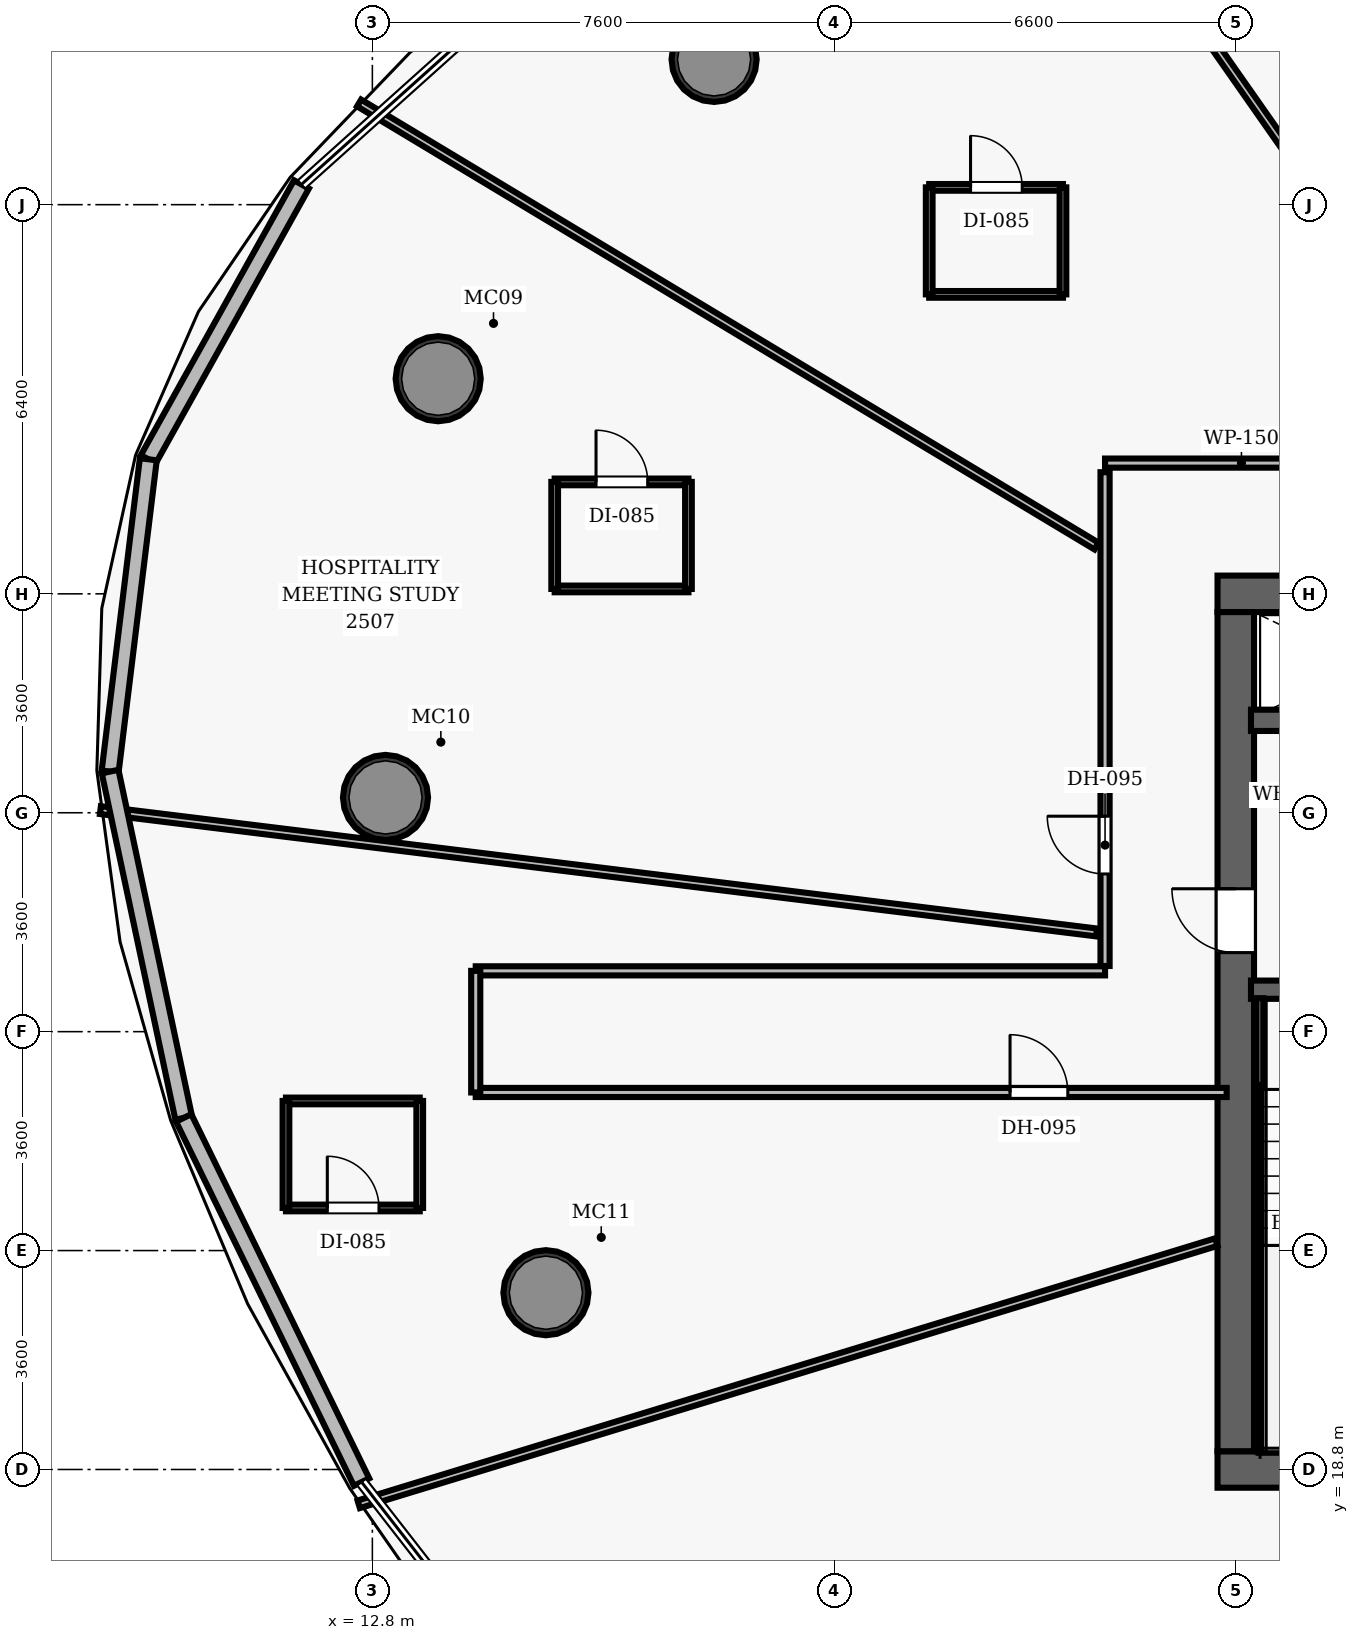
"""IFC4 building model, lengths in metres.
Left out: names, types, materials, properties, quantities, classifications, styles, units other than length and angle.
Written with IfcOpenShell. Run it as: python <this file> out.ifc"""

import sys

from ifc_helpers import new_model, si_unit, direction, frame, frame_2d, origin, origin_2d, place, context, subcontext, project, spatial, rectangle, hollow_circle, extrude, element, fill, save


model = new_model("IFC4")
c1 = context("Model", 3, precision=1e-05, world=origin(), true_north=direction((0.0, 1.0)))
c2 = subcontext(c1, "Body", "Model", "MODEL_VIEW")
j1 = project(units=[si_unit("LENGTHUNIT", "METRE"), si_unit("PLANEANGLEUNIT", "RADIAN")], contexts=[c1])
p1 = place(None, origin())
s1 = spatial("IfcSite", under=j1, at=p1, CompositionType="ELEMENT")
p2 = place(p1, origin())
s2 = spatial("IfcBuilding", under=s1, at=p2, CompositionType="ELEMENT")
p3 = place(p2, frame((0.0, 0.0, 106.3)))
s3 = spatial("IfcBuildingStorey", under=s2, at=p3, CompositionType="ELEMENT", Elevation=106.3)
p4 = place(p3, frame((26.7, 18.8, 0.0), z_axis=(0.0, 0.0, 1.0), x_axis=(1.0, 0.0, 0.0)))
e1 = element("IfcWall", 1, at=p4, inside=s3, PredefinedType="SHEAR", context=c2, shape_type="SweptSolid", body=[
    extrude(rectangle(XDim=22.6, YDim=0.6, at=frame_2d((11.3, 0.0))), origin(), (0.0, 0.0, 1.0), 3.5),
])
p5 = place(p4, frame((14.52, 0.0, 0.0)))
e2 = element("IfcOpeningElement", 2, at=p5, cuts=e1, PredefinedType="OPENING", context=c2, shape_type="SweptSolid", body=[
    extrude(rectangle(XDim=1.05, YDim=2.15, at=frame_2d((0.525, 1.075))), frame((0.0, 0.31, 0.0), z_axis=(0.0, -1.0, 0.0), x_axis=(1.0, 0.0, 0.0)), (0.0, 0.0, 1.0), 0.62),
])
p6 = place(p3, frame((26.7, 33.2, 0.0), z_axis=(0.0, 0.0, 1.0), x_axis=(1.0, 0.0, 0.0)))
e3 = element("IfcWall", 3, at=p6, inside=s3, PredefinedType="SHEAR", context=c2, shape_type="SweptSolid", body=[
    extrude(rectangle(XDim=22.6, YDim=0.6, at=frame_2d((11.3, 0.0))), origin(), (0.0, 0.0, 1.0), 3.5),
])
p7 = place(p6, frame((4.62, 0.0, 0.0)))
e4 = element("IfcOpeningElement", 4, at=p7, cuts=e3, PredefinedType="OPENING", context=c2, shape_type="SweptSolid", body=[
    extrude(rectangle(XDim=1.05, YDim=2.15, at=frame_2d((0.525, 1.075))), frame((0.0, 0.31, 0.0), z_axis=(0.0, -1.0, 0.0), x_axis=(1.0, 0.0, 0.0)), (0.0, 0.0, 1.0), 0.62),
])
p8 = place(p6, frame((14.52, 0.0, 0.0)))
e5 = element("IfcOpeningElement", 5, at=p8, cuts=e3, PredefinedType="OPENING", context=c2, shape_type="SweptSolid", body=[
    extrude(rectangle(XDim=1.05, YDim=2.15, at=frame_2d((0.525, 1.075))), frame((0.0, 0.31, 0.0), z_axis=(0.0, -1.0, 0.0), x_axis=(1.0, 0.0, 0.0)), (0.0, 0.0, 1.0), 0.62),
])
p9 = place(p3, frame((27.0, 19.1, 0.0), z_axis=(0.0, 0.0, 1.0), x_axis=(0.0, 1.0, 0.0)))
e6 = element("IfcWall", 6, at=p9, inside=s3, PredefinedType="SHEAR", context=c2, shape_type="SweptSolid", body=[
    extrude(rectangle(XDim=13.8, YDim=0.6, at=frame_2d((6.9, 0.0))), origin(), (0.0, 0.0, 1.0), 3.5),
])
p10 = place(p9, frame((8.2, 0.0, 0.0)))
e7 = element("IfcOpeningElement", 7, at=p10, cuts=e6, PredefinedType="OPENING", context=c2, shape_type="SweptSolid", body=[
    extrude(rectangle(XDim=1.05, YDim=2.15, at=frame_2d((0.525, 1.075))), frame((0.0, 0.31, 0.0), z_axis=(0.0, -1.0, 0.0), x_axis=(1.0, 0.0, 0.0)), (0.0, 0.0, 1.0), 0.62),
])
for number, where, z_axis, x_axis in (
    (8, (18.42, 41.989, 0.0), (0.0, 0.0, 1.0), (1.0, 0.0, 0.0)),
    (9, (13.882, 36.738, 0.0), (0.0, 0.0, 1.0), (1.0, 0.0, 0.0)),
    (10, (13.016, 29.852, 0.0), (0.0, 0.0, 1.0), (1.0, 0.0, 0.0)),
    (11, (15.654, 21.707, 0.0), (0.0, 0.0, 1.0), (1.0, 0.0, 0.0)),
):
    element("IfcColumn", number, at=place(p3, frame(where, z_axis=z_axis, x_axis=x_axis)), inside=s3, PredefinedType="COLUMN", context=c2, shape_type="SweptSolid", body=[
        extrude(hollow_circle(Radius=0.7, WallThickness=0.055, at=origin_2d()), origin(), (0.0, 0.0, 1.0), 3.5),
    ])
p11 = place(p3, frame((27.25, 26.69, 0.0), z_axis=(0.0, 0.0, 1.0), x_axis=(1.0, 0.0, 0.0)))
e12 = element("IfcWall", 12, at=p11, inside=s3, PredefinedType="SHEAR", context=c2, shape_type="SweptSolid", body=[
    extrude(rectangle(XDim=3.67, YDim=0.3, at=frame_2d((1.835, 0.0))), origin(), (0.0, 0.0, 1.0), 3.5),
])
p12 = place(p11, frame((1.05, 0.0, 0.0)))
e13 = element("IfcOpeningElement", 13, at=p12, cuts=e12, PredefinedType="OPENING", context=c2, shape_type="SweptSolid", body=[
    extrude(rectangle(XDim=1.1, YDim=2.15, at=frame_2d((0.55, 1.075))), frame((0.0, 0.16, 0.0), z_axis=(0.0, -1.0, 0.0), x_axis=(1.0, 0.0, 0.0)), (0.0, 0.0, 1.0), 0.32),
])
p13 = place(p3, frame((27.395, 19.1, 0.0), z_axis=(0.0, 0.0, 1.0), x_axis=(0.0, 1.0, 0.0)))
e14 = element("IfcWall", 14, at=p13, inside=s3, PredefinedType="SHEAR", context=c2, shape_type="SweptSolid", body=[
    extrude(rectangle(XDim=7.45, YDim=0.12, at=frame_2d((3.725, 0.0))), origin(), (0.0, 0.0, 1.0), 3.5),
])
p14 = place(p3, frame((27.395, 19.16, 0.0), z_axis=(0.0, 0.0, 1.0), x_axis=(1.0, 0.0, 0.0)))
e15 = element("IfcWall", 15, at=p14, inside=s3, PredefinedType="SHEAR", context=c2, shape_type="SweptSolid", body=[
    extrude(rectangle(XDim=3.095, YDim=0.12, at=frame_2d((1.547, 0.0))), origin(), (0.0, 0.0, 1.0), 3.5),
])
p15 = place(p3, frame((27.25, 31.12, 0.0), z_axis=(0.0, 0.0, 1.0), x_axis=(1.0, 0.0, 0.0)))
e16 = element("IfcWall", 16, at=p15, inside=s3, PredefinedType="SHEAR", context=c2, shape_type="SweptSolid", body=[
    extrude(rectangle(XDim=3.67, YDim=0.35, at=frame_2d((1.835, 0.0))), origin(), (0.0, 0.0, 1.0), 2.675),
])
p16 = place(p15, frame((1.25, 0.0, 0.0)))
e17 = element("IfcOpeningElement", 17, at=p16, cuts=e16, PredefinedType="OPENING", context=c2, shape_type="SweptSolid", body=[
    extrude(rectangle(XDim=1.1, YDim=2.15, at=frame_2d((0.55, 1.075))), frame((0.0, 0.185, 0.0), z_axis=(0.0, -1.0, 0.0), x_axis=(1.0, 0.0, 0.0)), (0.0, 0.0, 1.0), 0.37),
])
p17 = place(p3, frame((24.85, 35.35, 0.0), z_axis=(0.0, 0.0, 1.0), x_axis=(1.0, 0.0, 0.0)))
e18 = element("IfcWall", 18, at=p17, inside=s3, PredefinedType="PARTITIONING", context=c2, shape_type="SweptSolid", body=[
    extrude(rectangle(XDim=26.0, YDim=0.15, at=frame_2d((13.0, 0.0))), origin(), (0.0, 0.0, 1.0), 2.675),
])
p18 = place(p17, frame((21.017, 0.0, 0.0)))
e19 = element("IfcOpeningElement", 19, at=p18, cuts=e18, PredefinedType="OPENING", context=c2, shape_type="SweptSolid", body=[
    extrude(rectangle(XDim=0.95, YDim=2.15, at=frame_2d((0.475, 1.075))), frame((0.0, 0.085, 0.0), z_axis=(0.0, -1.0, 0.0), x_axis=(1.0, 0.0, 0.0)), (0.0, 0.0, 1.0), 0.17),
])
p19 = place(p17, frame((15.954, 0.0, 0.0)))
e20 = element("IfcOpeningElement", 20, at=p19, cuts=e18, PredefinedType="OPENING", context=c2, shape_type="SweptSolid", body=[
    extrude(rectangle(XDim=0.95, YDim=2.15, at=frame_2d((0.475, 1.075))), frame((0.0, 0.085, 0.0), z_axis=(0.0, -1.0, 0.0), x_axis=(1.0, 0.0, 0.0)), (0.0, 0.0, 1.0), 0.17),
])
p20 = place(p17, frame((12.155, 0.0, 0.0)))
e21 = element("IfcOpeningElement", 21, at=p20, cuts=e18, PredefinedType="OPENING", context=c2, shape_type="SweptSolid", body=[
    extrude(rectangle(XDim=0.95, YDim=2.15, at=frame_2d((0.475, 1.075))), frame((0.0, 0.085, 0.0), z_axis=(0.0, -1.0, 0.0), x_axis=(1.0, 0.0, 0.0)), (0.0, 0.0, 1.0), 0.17),
])
p21 = place(p17, frame((7.086, 0.0, 0.0)))
e22 = element("IfcOpeningElement", 22, at=p21, cuts=e18, PredefinedType="OPENING", context=c2, shape_type="SweptSolid", body=[
    extrude(rectangle(XDim=0.95, YDim=2.15, at=frame_2d((0.475, 1.075))), frame((0.0, 0.085, 0.0), z_axis=(0.0, -1.0, 0.0), x_axis=(1.0, 0.0, 0.0)), (0.0, 0.0, 1.0), 0.17),
])
p22 = place(p17, frame((4.637, 0.0, 0.0)))
e23 = element("IfcOpeningElement", 23, at=p22, cuts=e18, PredefinedType="OPENING", context=c2, shape_type="SweptSolid", body=[
    extrude(rectangle(XDim=0.95, YDim=2.15, at=frame_2d((0.475, 1.075))), frame((0.0, 0.085, 0.0), z_axis=(0.0, -1.0, 0.0), x_axis=(1.0, 0.0, 0.0)), (0.0, 0.0, 1.0), 0.17),
])
p23 = place(p3, frame((24.85, 27.08, 0.0), z_axis=(0.0, 0.0, 1.0), x_axis=(0.0, 1.0, 0.0)))
e24 = element("IfcWall", 24, at=p23, inside=s3, PredefinedType="PARTITIONING", context=c2, shape_type="SweptSolid", body=[
    extrude(rectangle(XDim=8.12, YDim=0.15, at=frame_2d((4.06, 0.0))), origin(), (0.0, 0.0, 1.0), 2.675),
])
p24 = place(p23, frame((1.513, 0.0, 0.0)))
e25 = element("IfcOpeningElement", 25, at=p24, cuts=e24, PredefinedType="OPENING", context=c2, shape_type="SweptSolid", body=[
    extrude(rectangle(XDim=0.95, YDim=2.15, at=frame_2d((0.475, 1.075))), frame((0.0, 0.085, 0.0), z_axis=(0.0, -1.0, 0.0), x_axis=(1.0, 0.0, 0.0)), (0.0, 0.0, 1.0), 0.17),
])
p25 = place(p3, frame((14.5, 27.0, 0.0), z_axis=(0.0, 0.0, 1.0), x_axis=(1.0, 0.0, 0.0)))
e26 = element("IfcWall", 26, at=p25, inside=s3, PredefinedType="PARTITIONING", context=c2, shape_type="SweptSolid", body=[
    extrude(rectangle(XDim=10.35, YDim=0.15, at=frame_2d((5.175, 0.0))), origin(), (0.0, 0.0, 1.0), 2.675),
])
p26 = place(p3, frame((14.5, 25.0, 0.0), z_axis=(0.0, 0.0, 1.0), x_axis=(1.0, 0.0, 0.0)))
e27 = element("IfcWall", 27, at=p26, inside=s3, PredefinedType="PARTITIONING", context=c2, shape_type="SweptSolid", body=[
    extrude(rectangle(XDim=12.35, YDim=0.15, at=frame_2d((6.175, 0.0))), origin(), (0.0, 0.0, 1.0), 2.675),
])
p27 = place(p26, frame((8.788, 0.0, 0.0)))
e28 = element("IfcOpeningElement", 28, at=p27, cuts=e27, PredefinedType="OPENING", context=c2, shape_type="SweptSolid", body=[
    extrude(rectangle(XDim=0.95, YDim=2.15, at=frame_2d((0.475, 1.075))), frame((0.0, 0.085, 0.0), z_axis=(0.0, -1.0, 0.0), x_axis=(1.0, 0.0, 0.0)), (0.0, 0.0, 1.0), 0.17),
])
p28 = place(p3, frame((14.5, 25.0, 0.0), z_axis=(0.0, 0.0, 1.0), x_axis=(0.0, 1.0, 0.0)))
e29 = element("IfcWall", 29, at=p28, inside=s3, PredefinedType="PARTITIONING", context=c2, shape_type="SweptSolid", body=[
    extrude(rectangle(XDim=2.0, YDim=0.15, at=frame_2d((1.0, 0.0))), origin(), (0.0, 0.0, 1.0), 2.675),
])
p29 = place(p3, frame((31.355, 35.49, 0.0), z_axis=(0.0, 0.0, 1.0), x_axis=(-0.573570204907, 0.819156407557, 0.0)))
e30 = element("IfcWall", 30, at=p29, inside=s3, PredefinedType="PARTITIONING", context=c2, shape_type="SweptSolid", body=[
    extrude(rectangle(XDim=14.735, YDim=0.13, at=frame_2d((7.367, 0.0))), origin(), (0.0, 0.0, 1.0), 2.675),
])
p30 = place(p3, frame((24.71, 33.985, 0.0), z_axis=(0.0, 0.0, 1.0), x_axis=(-0.85716694246, 0.515038671125, 0.0)))
e31 = element("IfcWall", 31, at=p30, inside=s3, PredefinedType="PARTITIONING", context=c2, shape_type="SweptSolid", body=[
    extrude(rectangle(XDim=14.149, YDim=0.13, at=frame_2d((7.075, 0.0))), origin(), (0.0, 0.0, 1.0), 2.675),
])
p31 = place(p3, frame((24.71, 27.632, 0.0), z_axis=(0.0, 0.0, 1.0), x_axis=(-0.992546751309, 0.121864459407, 0.0)))
e32 = element("IfcWall", 32, at=p31, inside=s3, PredefinedType="PARTITIONING", context=c2, shape_type="SweptSolid", body=[
    extrude(rectangle(XDim=16.506, YDim=0.13, at=frame_2d((8.253, 0.0))), origin(), (0.0, 0.0, 1.0), 2.675),
])
p32 = place(p3, frame((26.68, 22.539, 0.0), z_axis=(0.0, 0.0, 1.0), x_axis=(-0.956307870359, -0.292361517799, 0.0)))
e33 = element("IfcWall", 33, at=p32, inside=s3, PredefinedType="PARTITIONING", context=c2, shape_type="SweptSolid", body=[
    extrude(rectangle(XDim=14.749, YDim=0.13, at=frame_2d((7.375, 0.0))), origin(), (0.0, 0.0, 1.0), 2.675),
])
p33 = place(p3, frame((29.349, 18.48, 0.0), z_axis=(0.0, 0.0, 1.0), x_axis=(-0.754706894701, -0.656062118317, 0.0)))
e34 = element("IfcWall", 34, at=p33, inside=s3, PredefinedType="PARTITIONING", context=c2, shape_type="SweptSolid", body=[
    extrude(rectangle(XDim=12.805, YDim=0.13, at=frame_2d((6.403, 0.0))), origin(), (0.0, 0.0, 1.0), 2.675),
])
p34 = place(p3, frame((21.958, 38.125, 0.0), z_axis=(0.0, 0.0, 1.0), x_axis=(1.0, 0.0, 0.0)))
e35 = element("IfcWall", 35, at=p34, inside=s3, PredefinedType="PARTITIONING", context=c2, shape_type="SweptSolid", body=[
    extrude(rectangle(XDim=2.2, YDim=0.11, at=frame_2d((1.1, 0.0))), origin(), (0.0, 0.0, 1.0), 2.675),
])
p35 = place(p3, frame((21.958, 39.885, 0.0), z_axis=(0.0, 0.0, 1.0), x_axis=(1.0, 0.0, 0.0)))
e36 = element("IfcWall", 36, at=p35, inside=s3, PredefinedType="PARTITIONING", context=c2, shape_type="SweptSolid", body=[
    extrude(rectangle(XDim=2.2, YDim=0.11, at=frame_2d((1.1, 0.0))), origin(), (0.0, 0.0, 1.0), 2.675),
])
p36 = place(p35, frame((0.68, 0.0, 0.0)))
e37 = element("IfcOpeningElement", 37, at=p36, cuts=e36, PredefinedType="OPENING", context=c2, shape_type="SweptSolid", body=[
    extrude(rectangle(XDim=0.85, YDim=2.1, at=frame_2d((0.425, 1.05))), frame((0.0, 0.065, 0.0), z_axis=(0.0, -1.0, 0.0), x_axis=(1.0, 0.0, 0.0)), (0.0, 0.0, 1.0), 0.13),
])
for number, where, z_axis, x_axis in (
    (38, (21.958, 38.125, 0.0), (0.0, 0.0, 1.0), (0.0, 1.0, 0.0)),
    (39, (24.158, 38.125, 0.0), (0.0, 0.0, 1.0), (0.0, 1.0, 0.0)),
):
    element("IfcWall", number, at=place(p3, frame(where, z_axis=z_axis, x_axis=x_axis)), inside=s3, PredefinedType="PARTITIONING", context=c2, shape_type="SweptSolid", body=[
        extrude(rectangle(XDim=1.76, YDim=0.11, at=frame_2d((0.88, 0.0))), origin(), (0.0, 0.0, 1.0), 2.675),
    ])
p37 = place(p3, frame((15.798, 33.281, 0.0), z_axis=(0.0, 0.0, 1.0), x_axis=(1.0, 0.0, 0.0)))
e40 = element("IfcWall", 40, at=p37, inside=s3, PredefinedType="PARTITIONING", context=c2, shape_type="SweptSolid", body=[
    extrude(rectangle(XDim=2.2, YDim=0.11, at=frame_2d((1.1, 0.0))), origin(), (0.0, 0.0, 1.0), 2.675),
])
p38 = place(p3, frame((15.798, 35.041, 0.0), z_axis=(0.0, 0.0, 1.0), x_axis=(1.0, 0.0, 0.0)))
e41 = element("IfcWall", 41, at=p38, inside=s3, PredefinedType="PARTITIONING", context=c2, shape_type="SweptSolid", body=[
    extrude(rectangle(XDim=2.2, YDim=0.11, at=frame_2d((1.1, 0.0))), origin(), (0.0, 0.0, 1.0), 2.675),
])
p39 = place(p38, frame((0.68, 0.0, 0.0)))
e42 = element("IfcOpeningElement", 42, at=p39, cuts=e41, PredefinedType="OPENING", context=c2, shape_type="SweptSolid", body=[
    extrude(rectangle(XDim=0.85, YDim=2.1, at=frame_2d((0.425, 1.05))), frame((0.0, 0.065, 0.0), z_axis=(0.0, -1.0, 0.0), x_axis=(1.0, 0.0, 0.0)), (0.0, 0.0, 1.0), 0.13),
])
for number, where, z_axis, x_axis in (
    (43, (15.798, 33.281, 0.0), (0.0, 0.0, 1.0), (0.0, 1.0, 0.0)),
    (44, (17.998, 33.281, 0.0), (0.0, 0.0, 1.0), (0.0, 1.0, 0.0)),
):
    element("IfcWall", number, at=place(p3, frame(where, z_axis=z_axis, x_axis=x_axis)), inside=s3, PredefinedType="PARTITIONING", context=c2, shape_type="SweptSolid", body=[
        extrude(rectangle(XDim=1.76, YDim=0.11, at=frame_2d((0.88, 0.0))), origin(), (0.0, 0.0, 1.0), 2.675),
    ])
p40 = place(p3, frame((11.379, 23.101, 0.0), z_axis=(0.0, 0.0, 1.0), x_axis=(1.0, 0.0, 0.0)))
e45 = element("IfcWall", 45, at=p40, inside=s3, PredefinedType="PARTITIONING", context=c2, shape_type="SweptSolid", body=[
    extrude(rectangle(XDim=2.2, YDim=0.11, at=frame_2d((1.1, 0.0))), origin(), (0.0, 0.0, 1.0), 2.675),
])
p41 = place(p40, frame((0.68, 0.0, 0.0)))
e46 = element("IfcOpeningElement", 46, at=p41, cuts=e45, PredefinedType="OPENING", context=c2, shape_type="SweptSolid", body=[
    extrude(rectangle(XDim=0.85, YDim=2.1, at=frame_2d((0.425, 1.05))), frame((0.0, 0.065, 0.0), z_axis=(0.0, -1.0, 0.0), x_axis=(1.0, 0.0, 0.0)), (0.0, 0.0, 1.0), 0.13),
])
p42 = place(p3, frame((11.379, 24.861, 0.0), z_axis=(0.0, 0.0, 1.0), x_axis=(1.0, 0.0, 0.0)))
e47 = element("IfcWall", 47, at=p42, inside=s3, PredefinedType="PARTITIONING", context=c2, shape_type="SweptSolid", body=[
    extrude(rectangle(XDim=2.2, YDim=0.11, at=frame_2d((1.1, 0.0))), origin(), (0.0, 0.0, 1.0), 2.675),
])
for number, where, z_axis, x_axis in (
    (48, (11.379, 23.101, 0.0), (0.0, 0.0, 1.0), (0.0, 1.0, 0.0)),
    (49, (13.579, 23.101, 0.0), (0.0, 0.0, 1.0), (0.0, 1.0, 0.0)),
):
    element("IfcWall", number, at=place(p3, frame(where, z_axis=z_axis, x_axis=x_axis)), inside=s3, PredefinedType="PARTITIONING", context=c2, shape_type="SweptSolid", body=[
        extrude(rectangle(XDim=1.76, YDim=0.11, at=frame_2d((0.88, 0.0))), origin(), (0.0, 0.0, 1.0), 2.675),
    ])
p43 = place(p3, frame((9.115, 35.413, 0.0), z_axis=(0.0, 0.0, 1.0), x_axis=(0.486776225007, 0.873526706385, 0.0)))
e50 = element("IfcWall", 50, at=p43, inside=s3, PredefinedType="SOLIDWALL", context=c2, shape_type="SweptSolid", body=[
    extrude(rectangle(XDim=5.175, YDim=0.28, at=frame_2d((2.587, 0.0))), origin(), (0.0, 0.0, 1.0), 3.26),
])
p44 = place(p3, frame((8.487, 30.277, 0.0), z_axis=(0.0, 0.0, 1.0), x_axis=(0.121357138015, 0.992608908409, 0.0)))
e51 = element("IfcWall", 51, at=p44, inside=s3, PredefinedType="SOLIDWALL", context=c2, shape_type="SweptSolid", body=[
    extrude(rectangle(XDim=5.174, YDim=0.28, at=frame_2d((2.587, 0.0))), origin(), (0.0, 0.0, 1.0), 3.26),
])
p45 = place(p3, frame((9.697, 24.581, 0.0), z_axis=(0.0, 0.0, 1.0), x_axis=(-0.207793566565, 0.978172701364, 0.0)))
e52 = element("IfcWall", 52, at=p45, inside=s3, PredefinedType="SOLIDWALL", context=c2, shape_type="SweptSolid", body=[
    extrude(rectangle(XDim=5.823, YDim=0.28, at=frame_2d((2.912, 0.0))), origin(), (0.0, 0.0, 1.0), 3.26),
])
p46 = place(p3, frame((12.623, 18.593, 0.0), z_axis=(0.0, 0.0, 1.0), x_axis=(-0.43894534719, 0.898513762933, 0.0)))
e53 = element("IfcWall", 53, at=p46, inside=s3, PredefinedType="SOLIDWALL", context=c2, shape_type="SweptSolid", body=[
    extrude(rectangle(XDim=6.665, YDim=0.28, at=frame_2d((3.333, 0.0))), origin(), (0.0, 0.0, 1.0), 3.26),
])
p47 = place(p10, origin())
e54 = element("IfcDoor", 54, at=p47, inside=s3, OperationType="SINGLE_SWING_RIGHT", PredefinedType="DOOR", context=c2, shape_type="SweptSolid", body=[
    extrude(rectangle(XDim=1.05, YDim=2.15, at=frame_2d((0.525, 1.075))), frame((0.0, 0.025, 0.0), z_axis=(0.0, -1.0, 0.0), x_axis=(1.0, 0.0, 0.0)), (0.0, 0.0, 1.0), 0.05),
])
fill(e7, e54)
p48 = place(p36, origin())
e55 = element("IfcDoor", 55, at=p48, inside=s3, OperationType="SINGLE_SWING_LEFT", PredefinedType="DOOR", context=c2, shape_type="SweptSolid", body=[
    extrude(rectangle(XDim=0.85, YDim=2.1, at=frame_2d((0.425, 1.05))), frame((0.0, 0.025, 0.0), z_axis=(0.0, -1.0, 0.0), x_axis=(1.0, 0.0, 0.0)), (0.0, 0.0, 1.0), 0.05),
])
fill(e37, e55)
p49 = place(p24, origin())
e56 = element("IfcDoor", 56, at=p49, inside=s3, OperationType="SINGLE_SWING_RIGHT", PredefinedType="DOOR", context=c2, shape_type="SweptSolid", body=[
    extrude(rectangle(XDim=0.95, YDim=2.15, at=frame_2d((0.475, 1.075))), frame((0.0, 0.025, 0.0), z_axis=(0.0, -1.0, 0.0), x_axis=(1.0, 0.0, 0.0)), (0.0, 0.0, 1.0), 0.05),
])
fill(e25, e56)
p50 = place(p39, origin())
e57 = element("IfcDoor", 57, at=p50, inside=s3, OperationType="SINGLE_SWING_LEFT", PredefinedType="DOOR", context=c2, shape_type="SweptSolid", body=[
    extrude(rectangle(XDim=0.85, YDim=2.1, at=frame_2d((0.425, 1.05))), frame((0.0, 0.025, 0.0), z_axis=(0.0, -1.0, 0.0), x_axis=(1.0, 0.0, 0.0)), (0.0, 0.0, 1.0), 0.05),
])
fill(e42, e57)
p51 = place(p27, origin())
e58 = element("IfcDoor", 58, at=p51, inside=s3, OperationType="SINGLE_SWING_LEFT", PredefinedType="DOOR", context=c2, shape_type="SweptSolid", body=[
    extrude(rectangle(XDim=0.95, YDim=2.15, at=frame_2d((0.475, 1.075))), frame((0.0, 0.025, 0.0), z_axis=(0.0, -1.0, 0.0), x_axis=(1.0, 0.0, 0.0)), (0.0, 0.0, 1.0), 0.05),
])
fill(e28, e58)
p52 = place(p41, origin())
e59 = element("IfcDoor", 59, at=p52, inside=s3, OperationType="SINGLE_SWING_LEFT", PredefinedType="DOOR", context=c2, shape_type="SweptSolid", body=[
    extrude(rectangle(XDim=0.85, YDim=2.1, at=frame_2d((0.425, 1.05))), frame((0.0, 0.025, 0.0), z_axis=(0.0, -1.0, 0.0), x_axis=(1.0, 0.0, 0.0)), (0.0, 0.0, 1.0), 0.05),
])
fill(e46, e59)
save(model, sys.argv[1])
